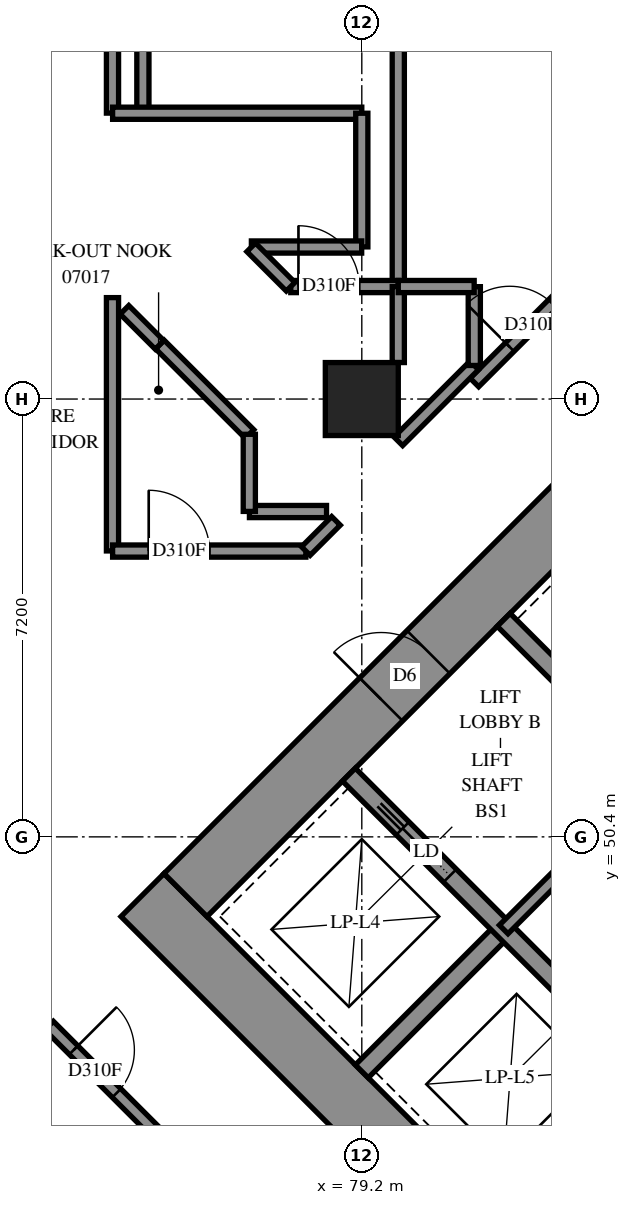
"""IFC4 building model, lengths in metres.
Left out: names, types, materials, properties, quantities, classifications, styles, units other than length and angle.
Written with IfcOpenShell. Run it as: python <this file> out.ifc"""

import sys

from ifc_helpers import new_model, si_unit, direction, frame, frame_2d, origin, origin_2d, place, context, subcontext, project, spatial, rectangle, extrude, element, fill, save


model = new_model("IFC4")
c1 = context("Model", 3, precision=1e-05, world=origin(), true_north=direction((0.0, 1.0)))
c2 = subcontext(c1, "Body", "Model", "MODEL_VIEW")
j1 = project(units=[si_unit("LENGTHUNIT", "METRE"), si_unit("PLANEANGLEUNIT", "RADIAN")], contexts=[c1])
p1 = place(None, origin())
s1 = spatial("IfcSite", under=j1, at=p1, CompositionType="ELEMENT")
p2 = place(p1, origin())
s2 = spatial("IfcBuilding", under=s1, at=p2, CompositionType="ELEMENT")
p3 = place(p2, frame((0.0, 0.0, 30.4)))
s3 = spatial("IfcBuildingStorey", under=s2, at=p3, CompositionType="ELEMENT", Elevation=30.4)
p4 = place(p3, frame((79.2, 57.6, 0.0), z_axis=(0.0, 0.0, 1.0), x_axis=(1.0, 0.0, 0.0)))
e1 = element("IfcColumn", 1, at=p4, inside=s3, PredefinedType="COLUMN", context=c2, shape_type="SweptSolid", body=[
    extrude(rectangle(XDim=1.2, YDim=1.2, at=origin_2d()), origin(), (0.0, 0.0, 1.0), 3.1),
])
p5 = place(p3, frame((75.594, 49.443, -0.3), z_axis=(0.0, 0.0, 1.0), x_axis=(0.7071037324, -0.70710983, 0.0)))
e2 = element("IfcWall", 2, at=p5, inside=s3, PredefinedType="SHEAR", context=c2, shape_type="SweptSolid", body=[
    extrude(rectangle(XDim=16.4, YDim=1.0, at=frame_2d((8.2, 0.0))), origin(), (0.0, 0.0, 1.0), 2.7),
])
p6 = place(p3, frame((76.301, 49.443, -0.3), z_axis=(0.0, 0.0, 1.0), x_axis=(0.7071067812, 0.7071067812, 0.0)))
e3 = element("IfcWall", 3, at=p6, inside=s3, PredefinedType="SHEAR", context=c2, shape_type="SweptSolid", body=[
    extrude(rectangle(XDim=14.4, YDim=1.0, at=frame_2d((7.2, 0.0))), origin(), (0.0, 0.0, 1.0), 2.7),
])
p7 = place(p6, frame((4.55, 0.0, 0.3)))
e4 = element("IfcOpeningElement", 4, at=p7, cuts=e3, PredefinedType="OPENING", context=c2, shape_type="SweptSolid", body=[
    extrude(rectangle(XDim=1.1, YDim=2.1, at=frame_2d((0.55, 1.05))), frame((0.0, 0.51, 0.0), z_axis=(0.0, -1.0, 0.0), x_axis=(1.0, 0.0, 0.0)), (0.0, 0.0, 1.0), 1.02),
])
p8 = place(p6, frame((11.35, 0.0, 0.3)))
e5 = element("IfcOpeningElement", 5, at=p8, cuts=e3, PredefinedType="OPENING", context=c2, shape_type="SweptSolid", body=[
    extrude(rectangle(XDim=1.1, YDim=2.1, at=frame_2d((0.55, 1.05))), frame((0.0, 0.51, 0.0), z_axis=(0.0, -1.0, 0.0), x_axis=(1.0, 0.0, 0.0)), (0.0, 0.0, 1.0), 1.02),
])
p9 = place(p3, frame((79.2, 46.544, 0.0), z_axis=(0.0, 0.0, 1.0), x_axis=(0.7071219326, 0.7070916295, 0.0)))
e6 = element("IfcWall", 6, at=p9, inside=s3, PredefinedType="SOLIDWALL", context=c2, shape_type="SweptSolid", body=[
    extrude(rectangle(XDim=3.3, YDim=0.3, at=frame_2d((1.65, 0.0))), origin(), (0.0, 0.0, 1.0), 3.1),
])
p10 = place(p3, frame((81.746, 43.999, 0.0), z_axis=(0.0, 0.0, 1.0), x_axis=(0.7071067812, 0.7071067812, 0.0)))
e7 = element("IfcWall", 7, at=p10, inside=s3, PredefinedType="SOLIDWALL", context=c2, shape_type="SweptSolid", body=[
    extrude(rectangle(XDim=3.3, YDim=0.3, at=frame_2d((1.65, 0.0))), origin(), (0.0, 0.0, 1.0), 3.1),
])
p11 = place(p3, frame((78.988, 51.423, 0.0), z_axis=(0.0, 0.0, 1.0), x_axis=(0.7071067812, -0.7071067812, 0.0)))
e8 = element("IfcWall", 8, at=p11, inside=s3, PredefinedType="SOLIDWALL", context=c2, shape_type="SweptSolid", body=[
    extrude(rectangle(XDim=14.4, YDim=0.3, at=frame_2d((7.2, 0.0))), origin(), (0.0, 0.0, 1.0), 3.1),
])
p12 = place(p11, frame((1.25, 0.0, 0.0)))
e9 = element("IfcOpeningElement", 9, at=p12, cuts=e8, PredefinedType="OPENING", context=c2, shape_type="SweptSolid", body=[
    extrude(rectangle(XDim=1.1, YDim=2.1, at=frame_2d((0.55, 1.05))), frame((0.0, 0.16, 0.0), z_axis=(0.0, -1.0, 0.0), x_axis=(1.0, 0.0, 0.0)), (0.0, 0.0, 1.0), 0.32),
])
p13 = place(p11, frame((4.85, 0.0, 0.0)))
e10 = element("IfcOpeningElement", 10, at=p13, cuts=e8, PredefinedType="OPENING", context=c2, shape_type="SweptSolid", body=[
    extrude(rectangle(XDim=1.1, YDim=2.1, at=frame_2d((0.55, 1.05))), frame((0.0, 0.16, 0.0), z_axis=(0.0, -1.0, 0.0), x_axis=(1.0, 0.0, 0.0)), (0.0, 0.0, 1.0), 0.32),
])
p14 = place(p11, frame((8.45, 0.0, 0.0)))
e11 = element("IfcOpeningElement", 11, at=p14, cuts=e8, PredefinedType="OPENING", context=c2, shape_type="SweptSolid", body=[
    extrude(rectangle(XDim=1.1, YDim=2.1, at=frame_2d((0.55, 1.05))), frame((0.0, 0.16, 0.0), z_axis=(0.0, -1.0, 0.0), x_axis=(1.0, 0.0, 0.0)), (0.0, 0.0, 1.0), 0.32),
])
p15 = place(p11, frame((12.05, 0.0, 0.0)))
e12 = element("IfcOpeningElement", 12, at=p15, cuts=e8, PredefinedType="OPENING", context=c2, shape_type="SweptSolid", body=[
    extrude(rectangle(XDim=1.1, YDim=2.1, at=frame_2d((0.55, 1.05))), frame((0.0, 0.16, 0.0), z_axis=(0.0, -1.0, 0.0), x_axis=(1.0, 0.0, 0.0)), (0.0, 0.0, 1.0), 0.32),
])
p16 = place(p3, frame((81.534, 53.969, 0.0), z_axis=(0.0, 0.0, 1.0), x_axis=(0.707103309, -0.7071102534, 0.0)))
e13 = element("IfcWall", 13, at=p16, inside=s3, PredefinedType="SOLIDWALL", context=c2, shape_type="SweptSolid", body=[
    extrude(rectangle(XDim=14.4, YDim=0.3, at=frame_2d((7.2, 0.0))), origin(), (0.0, 0.0, 1.0), 3.1),
])
p17 = place(p16, frame((12.05, 0.0, 0.0)))
e14 = element("IfcOpeningElement", 14, at=p17, cuts=e13, PredefinedType="OPENING", context=c2, shape_type="SweptSolid", body=[
    extrude(rectangle(XDim=1.1, YDim=2.1, at=frame_2d((0.55, 1.05))), frame((0.0, 0.16, 0.0), z_axis=(0.0, -1.0, 0.0), x_axis=(1.0, 0.0, 0.0)), (0.0, 0.0, 1.0), 0.32),
])
p18 = place(p3, frame((81.534, 48.878, 0.0), z_axis=(0.0, 0.0, 1.0), x_axis=(0.707092892, 0.7071206701, 0.0)))
e15 = element("IfcWall", 15, at=p18, inside=s3, PredefinedType="PARTITIONING", context=c2, shape_type="SweptSolid", body=[
    extrude(rectangle(XDim=3.6, YDim=0.2, at=frame_2d((1.8, 0.0))), origin(), (0.0, 0.0, 1.0), 3.1),
])
p19 = place(p3, frame((75.6, 62.3, 0.0), z_axis=(0.0, 0.0, 1.0), x_axis=(0.0, 1.0, 0.0)))
e16 = element("IfcWall", 16, at=p19, inside=s3, PredefinedType="PARTITIONING", context=c2, shape_type="SweptSolid", body=[
    extrude(rectangle(XDim=10.408, YDim=0.2, at=frame_2d((5.204, 0.0))), origin(), (0.0, 0.0, 1.0), 3.1),
])
p20 = place(p3, frame((81.052, 57.873, 0.0), z_axis=(0.0, 0.0, 1.0), x_axis=(0.7071067812, 0.7071067812, 0.0)))
e17 = element("IfcWall", 17, at=p20, inside=s3, PredefinedType="PARTITIONING", context=c2, shape_type="SweptSolid", body=[
    extrude(rectangle(XDim=8.18, YDim=0.2, at=frame_2d((4.09, 0.0))), origin(), (0.0, 0.0, 1.0), 3.1),
])
p21 = place(p20, frame((0.823, 0.0, 0.0)))
e18 = element("IfcOpeningElement", 18, at=p21, cuts=e17, PredefinedType="OPENING", context=c2, shape_type="SweptSolid", body=[
    extrude(rectangle(XDim=1.0, YDim=2.1, at=frame_2d((0.5, 1.05))), frame((0.0, 0.11, 0.0), z_axis=(0.0, -1.0, 0.0), x_axis=(1.0, 0.0, 0.0)), (0.0, 0.0, 1.0), 0.22),
])
p22 = place(p3, frame((75.1, 62.302, 0.0), z_axis=(0.0, 0.0, 1.0), x_axis=(0.0, 1.0, 0.0)))
e19 = element("IfcWall", 19, at=p22, inside=s3, PredefinedType="PARTITIONING", context=c2, shape_type="SweptSolid", body=[
    extrude(rectangle(XDim=5.598, YDim=0.2, at=frame_2d((2.799, 0.0))), origin(), (0.0, 0.0, 1.0), 3.1),
])
p23 = place(p3, frame((79.8, 59.45, 0.0), z_axis=(0.0, 0.0, 1.0), x_axis=(0.0, 1.0, 0.0)))
e20 = element("IfcWall", 20, at=p23, inside=s3, PredefinedType="PARTITIONING", context=c2, shape_type="SweptSolid", body=[
    extrude(rectangle(XDim=4.75, YDim=0.2, at=frame_2d((2.375, 0.0))), origin(), (0.0, 0.0, 1.0), 3.1),
])
p24 = place(p3, frame((74.057, 47.297, 0.0), z_axis=(0.0, 0.0, 1.0), x_axis=(0.7071067812, -0.7071067812, 0.0)))
e21 = element("IfcWall", 21, at=p24, inside=s3, PredefinedType="PARTITIONING", context=c2, shape_type="SweptSolid", body=[
    extrude(rectangle(XDim=4.653, YDim=0.2, at=frame_2d((2.326, 0.0))), origin(), (0.0, 0.0, 1.0), 3.1),
])
p25 = place(p24, frame((0.57, 0.0, 0.0)))
e22 = element("IfcOpeningElement", 22, at=p25, cuts=e21, PredefinedType="OPENING", context=c2, shape_type="SweptSolid", body=[
    extrude(rectangle(XDim=1.0, YDim=2.1, at=frame_2d((0.5, 1.05))), frame((0.0, 0.11, 0.0), z_axis=(0.0, -1.0, 0.0), x_axis=(1.0, 0.0, 0.0)), (0.0, 0.0, 1.0), 0.22),
])
p26 = place(p3, frame((75.1, 55.102, 0.0), z_axis=(0.0, 0.0, 1.0), x_axis=(0.0, 1.0, 0.0)))
e23 = element("IfcWall", 23, at=p26, inside=s3, PredefinedType="PARTITIONING", context=c2, shape_type="SweptSolid", body=[
    extrude(rectangle(XDim=4.166, YDim=0.2, at=frame_2d((2.083, 0.0))), origin(), (0.0, 0.0, 1.0), 3.1),
])
p27 = place(p3, frame((75.102, 62.3, 0.0), z_axis=(0.0, 0.0, 1.0), x_axis=(1.0, 0.0, 0.0)))
e24 = element("IfcWall", 24, at=p27, inside=s3, PredefinedType="PARTITIONING", context=c2, shape_type="SweptSolid", body=[
    extrude(rectangle(XDim=4.098, YDim=0.2, at=frame_2d((2.049, 0.0))), origin(), (0.0, 0.0, 1.0), 3.1),
])
p28 = place(p3, frame((75.102, 55.1, 0.0), z_axis=(0.0, 0.0, 1.0), x_axis=(1.0, 0.0, 0.0)))
e25 = element("IfcWall", 25, at=p28, inside=s3, PredefinedType="PARTITIONING", context=c2, shape_type="SweptSolid", body=[
    extrude(rectangle(XDim=3.178, YDim=0.2, at=frame_2d((1.589, 0.0))), origin(), (0.0, 0.0, 1.0), 3.1),
])
p29 = place(p28, frame((0.594, 0.0, 0.0)))
e26 = element("IfcOpeningElement", 26, at=p29, cuts=e25, PredefinedType="OPENING", context=c2, shape_type="SweptSolid", body=[
    extrude(rectangle(XDim=1.0, YDim=2.1, at=frame_2d((0.5, 1.05))), frame((0.0, 0.11, 0.0), z_axis=(0.0, -1.0, 0.0), x_axis=(1.0, 0.0, 0.0)), (0.0, 0.0, 1.0), 0.22),
])
p30 = place(p3, frame((79.2, 60.102, 0.0), z_axis=(0.0, 0.0, 1.0), x_axis=(0.0, 1.0, 0.0)))
e27 = element("IfcWall", 27, at=p30, inside=s3, PredefinedType="PARTITIONING", context=c2, shape_type="SweptSolid", body=[
    extrude(rectangle(XDim=2.198, YDim=0.2, at=frame_2d((1.099, 0.0))), origin(), (0.0, 0.0, 1.0), 3.1),
])
p31 = place(p3, frame((75.879, 58.497, 0.0), z_axis=(0.0, 0.0, 1.0), x_axis=(0.7075866635, -0.706626573, 0.0)))
e28 = element("IfcWall", 28, at=p31, inside=s3, PredefinedType="PARTITIONING", context=c2, shape_type="SweptSolid", body=[
    extrude(rectangle(XDim=2.083, YDim=0.2, at=frame_2d((1.042, 0.0))), origin(), (0.0, 0.0, 1.0), 3.1),
])
p32 = place(p3, frame((77.384, 60.1, 0.0), z_axis=(0.0, 0.0, 1.0), x_axis=(1.0, 0.0, 0.0)))
e29 = element("IfcWall", 29, at=p32, inside=s3, PredefinedType="PARTITIONING", context=c2, shape_type="SweptSolid", body=[
    extrude(rectangle(XDim=1.814, YDim=0.2, at=frame_2d((0.907, 0.0))), origin(), (0.0, 0.0, 1.0), 3.1),
])
p33 = place(p3, frame((78.032, 59.45, 0.0), z_axis=(0.0, 0.0, 1.0), x_axis=(1.0, 0.0, 0.0)))
e30 = element("IfcWall", 30, at=p33, inside=s3, PredefinedType="PARTITIONING", context=c2, shape_type="SweptSolid", body=[
    extrude(rectangle(XDim=1.768, YDim=0.2, at=frame_2d((0.884, 0.0))), origin(), (0.0, 0.0, 1.0), 3.1),
])
p34 = place(p33, frame((0.126, 0.0, 0.0)))
e31 = element("IfcOpeningElement", 31, at=p34, cuts=e30, PredefinedType="OPENING", context=c2, shape_type="SweptSolid", body=[
    extrude(rectangle(XDim=1.0, YDim=2.1, at=frame_2d((0.5, 1.05))), frame((0.0, 0.11, 0.0), z_axis=(0.0, -1.0, 0.0), x_axis=(1.0, 0.0, 0.0)), (0.0, 0.0, 1.0), 0.22),
])
p35 = place(p3, frame((79.801, 56.905, 0.0), z_axis=(0.0, 0.0, 1.0), x_axis=(0.7071067812, 0.7071067812, 0.0)))
e32 = element("IfcWall", 32, at=p35, inside=s3, PredefinedType="PARTITIONING", context=c2, shape_type="SweptSolid", body=[
    extrude(rectangle(XDim=1.765, YDim=0.2, at=frame_2d((0.882, 0.0))), origin(), (0.0, 0.0, 1.0), 3.1),
])
p36 = place(p3, frame((81.05, 58.152, 0.0), z_axis=(0.0, 0.0, 1.0), x_axis=(0.0, 1.0, 0.0)))
e33 = element("IfcWall", 33, at=p36, inside=s3, PredefinedType="PARTITIONING", context=c2, shape_type="SweptSolid", body=[
    extrude(rectangle(XDim=1.296, YDim=0.2, at=frame_2d((0.648, 0.0))), origin(), (0.0, 0.0, 1.0), 3.1),
])
for number, where, z_axis, x_axis in (
    (34, (77.352, 55.75, 0.0), (0.0, 0.0, 1.0), (1.0, 0.0, 0.0)),
    (35, (77.35, 55.752, 0.0), (0.0, 0.0, 1.0), (0.0, 1.0, 0.0)),
):
    element("IfcWall", number, at=place(p3, frame(where, z_axis=z_axis, x_axis=x_axis)), inside=s3, PredefinedType="PARTITIONING", context=c2, shape_type="SweptSolid", body=[
        extrude(rectangle(XDim=1.268, YDim=0.2, at=frame_2d((0.634, 0.0))), origin(), (0.0, 0.0, 1.0), 3.1),
    ])
p37 = place(p3, frame((79.8, 58.2, 0.0), z_axis=(0.0, 0.0, 1.0), x_axis=(0.0, 1.0, 0.0)))
e36 = element("IfcWall", 36, at=p37, inside=s3, PredefinedType="PARTITIONING", context=c2, shape_type="SweptSolid", body=[
    extrude(rectangle(XDim=1.25, YDim=0.2, at=frame_2d((0.625, 0.0))), origin(), (0.0, 0.0, 1.0), 3.1),
])
p38 = place(p3, frame((79.8, 59.45, 0.0), z_axis=(0.0, 0.0, 1.0), x_axis=(1.0, 0.0, 0.0)))
e37 = element("IfcWall", 37, at=p38, inside=s3, PredefinedType="PARTITIONING", context=c2, shape_type="SweptSolid", body=[
    extrude(rectangle(XDim=1.248, YDim=0.2, at=frame_2d((0.624, 0.0))), origin(), (0.0, 0.0, 1.0), 3.1),
])
p39 = place(p3, frame((77.381, 60.095, 0.0), z_axis=(0.0, 0.0, 1.0), x_axis=(0.7071067812, -0.7071067812, 0.0)))
e38 = element("IfcWall", 38, at=p39, inside=s3, PredefinedType="PARTITIONING", context=c2, shape_type="SweptSolid", body=[
    extrude(rectangle(XDim=0.916, YDim=0.2, at=frame_2d((0.458, 0.0))), origin(), (0.0, 0.0, 1.0), 3.1),
])
p40 = place(p3, frame((75.297, 59.067, 0.0), z_axis=(0.0, 0.0, 1.0), x_axis=(0.7071067812, -0.7071067812, 0.0)))
e39 = element("IfcWall", 39, at=p40, inside=s3, PredefinedType="PARTITIONING", context=c2, shape_type="SweptSolid", body=[
    extrude(rectangle(XDim=0.815, YDim=0.2, at=frame_2d((0.407, 0.0))), origin(), (0.0, 0.0, 1.0), 3.1),
])
p41 = place(p3, frame((78.279, 55.1, 0.0), z_axis=(0.0, 0.0, 1.0), x_axis=(0.7071067812, 0.7071067812, 0.0)))
e40 = element("IfcWall", 40, at=p41, inside=s3, PredefinedType="PARTITIONING", context=c2, shape_type="SweptSolid", body=[
    extrude(rectangle(XDim=0.701, YDim=0.2, at=frame_2d((0.351, 0.0))), origin(), (0.0, 0.0, 1.0), 3.1),
])
p42 = place(p7, origin())
e41 = element("IfcDoor", 41, at=p42, inside=s3, OperationType="DOUBLE_DOOR_SINGLE_SWING", PredefinedType="DOOR", context=c2, shape_type="SweptSolid", body=[
    extrude(rectangle(XDim=1.1, YDim=2.1, at=frame_2d((0.55, 1.05))), frame((0.0, 0.025, 0.0), z_axis=(0.0, -1.0, 0.0), x_axis=(1.0, 0.0, 0.0)), (0.0, 0.0, 1.0), 0.05),
])
fill(e4, e41)
p43 = place(p12, origin())
e42 = element("IfcDoor", 42, at=p43, inside=s3, OperationType="SLIDING_TO_LEFT", PredefinedType="DOOR", context=c2, shape_type="SweptSolid", body=[
    extrude(rectangle(XDim=1.1, YDim=2.1, at=frame_2d((0.55, 1.05))), frame((0.0, 0.025, 0.0), z_axis=(0.0, -1.0, 0.0), x_axis=(1.0, 0.0, 0.0)), (0.0, 0.0, 1.0), 0.05),
])
fill(e9, e42)
p44 = place(p29, origin())
e43 = element("IfcDoor", 43, at=p44, inside=s3, OperationType="SINGLE_SWING_LEFT", PredefinedType="DOOR", context=c2, shape_type="SweptSolid", body=[
    extrude(rectangle(XDim=1.0, YDim=2.1, at=frame_2d((0.5, 1.05))), frame((0.0, 0.025, 0.0), z_axis=(0.0, -1.0, 0.0), x_axis=(1.0, 0.0, 0.0)), (0.0, 0.0, 1.0), 0.05),
])
fill(e26, e43)
p45 = place(p25, origin())
e44 = element("IfcDoor", 44, at=p45, inside=s3, OperationType="SINGLE_SWING_LEFT", PredefinedType="DOOR", context=c2, shape_type="SweptSolid", body=[
    extrude(rectangle(XDim=1.0, YDim=2.1, at=frame_2d((0.5, 1.05))), frame((0.0, 0.025, 0.0), z_axis=(0.0, -1.0, 0.0), x_axis=(1.0, 0.0, 0.0)), (0.0, 0.0, 1.0), 0.05),
])
fill(e22, e44)
p46 = place(p34, origin())
e45 = element("IfcDoor", 45, at=p46, inside=s3, OperationType="SINGLE_SWING_LEFT", PredefinedType="DOOR", context=c2, shape_type="SweptSolid", body=[
    extrude(rectangle(XDim=1.0, YDim=2.1, at=frame_2d((0.5, 1.05))), frame((0.0, 0.025, 0.0), z_axis=(0.0, -1.0, 0.0), x_axis=(1.0, 0.0, 0.0)), (0.0, 0.0, 1.0), 0.05),
])
fill(e31, e45)
p47 = place(p21, origin())
e46 = element("IfcDoor", 46, at=p47, inside=s3, OperationType="SINGLE_SWING_RIGHT", PredefinedType="DOOR", context=c2, shape_type="SweptSolid", body=[
    extrude(rectangle(XDim=1.0, YDim=2.1, at=frame_2d((0.5, 1.05))), frame((0.0, 0.025, 0.0), z_axis=(0.0, -1.0, 0.0), x_axis=(1.0, 0.0, 0.0)), (0.0, 0.0, 1.0), 0.05),
])
fill(e18, e46)
save(model, sys.argv[1])
